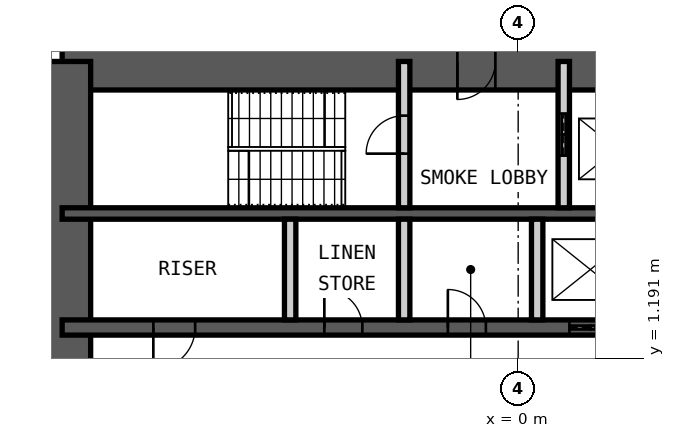
"""IFC4 building model, lengths in metres.
Left out: names, types, materials, properties, quantities, classifications, styles, units other than length and angle.
Written with IfcOpenShell. Run it as: python <this file> out.ifc"""

import sys

from ifc_helpers import new_model, si_unit, direction, frame, frame_2d, origin, place, context, subcontext, project, spatial, rectangle, extrude, element, fill, save


model = new_model("IFC4")
c1 = context("Model", 3, precision=1e-05, world=origin(), true_north=direction((0.0, 1.0)))
c2 = subcontext(c1, "Body", "Model", "MODEL_VIEW")
j1 = project(units=[si_unit("LENGTHUNIT", "METRE"), si_unit("PLANEANGLEUNIT", "RADIAN")], contexts=[c1])
p1 = place(None, origin())
s1 = spatial("IfcSite", under=j1, at=p1, CompositionType="ELEMENT")
p2 = place(p1, origin())
s2 = spatial("IfcBuilding", under=s1, at=p2, CompositionType="ELEMENT")
p3 = place(p2, frame((0.0, 0.0, 103.0)))
s3 = spatial("IfcBuildingStorey", under=s2, at=p3, CompositionType="ELEMENT", Elevation=103.0)
p4 = place(p3, frame((-12.0, 9.0, 0.0), z_axis=(0.0, 0.0, 1.0), x_axis=(1.0, 0.0, 0.0)))
e1 = element("IfcWall", 1, at=p4, inside=s3, PredefinedType="SHEAR", context=c2, shape_type="SweptSolid", body=[
    extrude(rectangle(XDim=24.0, YDim=1.5, at=frame_2d((12.0, 0.0))), origin(), (0.0, 0.0, 1.0), 4.2),
])
p5 = place(p4, frame((10.4, 0.0, 0.0)))
e2 = element("IfcOpeningElement", 2, at=p5, cuts=e1, PredefinedType="OPENING", context=c2, shape_type="SweptSolid", body=[
    extrude(rectangle(XDim=1.0, YDim=2.1, at=frame_2d((0.5, 1.05))), frame((0.0, 0.76, 0.0), z_axis=(0.0, -1.0, 0.0), x_axis=(1.0, 0.0, 0.0)), (0.0, 0.0, 1.0), 1.52),
])
p6 = place(p4, frame((17.6, 0.0, 0.0)))
e3 = element("IfcOpeningElement", 3, at=p6, cuts=e1, PredefinedType="OPENING", context=c2, shape_type="SweptSolid", body=[
    extrude(rectangle(XDim=0.9, YDim=2.1, at=frame_2d((0.45, 1.05))), frame((0.0, 0.76, 0.0), z_axis=(0.0, -1.0, 0.0), x_axis=(1.0, 0.0, 0.0)), (0.0, 0.0, 1.0), 1.52),
])
p7 = place(p4, frame((21.9, 0.0, 0.0)))
e4 = element("IfcOpeningElement", 4, at=p7, cuts=e1, PredefinedType="OPENING", context=c2, shape_type="SweptSolid", body=[
    extrude(rectangle(XDim=0.9, YDim=2.1, at=frame_2d((0.45, 1.05))), frame((0.0, 0.76, 0.0), z_axis=(0.0, -1.0, 0.0), x_axis=(1.0, 0.0, 0.0)), (0.0, 0.0, 1.0), 1.52),
])
p8 = place(p3, frame((-12.0, -9.0, 0.0), z_axis=(0.0, 0.0, 1.0), x_axis=(0.0, 1.0, 0.0)))
e5 = element("IfcWall", 5, at=p8, inside=s3, PredefinedType="SHEAR", context=c2, shape_type="SweptSolid", body=[
    extrude(rectangle(XDim=18.0, YDim=1.5, at=frame_2d((9.0, 0.0))), origin(), (0.0, 0.0, 1.0), 4.2),
])
p9 = place(p8, frame((8.1, 0.0, 0.0)))
e6 = element("IfcOpeningElement", 6, at=p9, cuts=e5, PredefinedType="OPENING", context=c2, shape_type="SweptSolid", body=[
    extrude(rectangle(XDim=1.8, YDim=2.1, at=frame_2d((0.9, 1.05))), frame((0.0, 0.76, 0.0), z_axis=(0.0, -1.0, 0.0), x_axis=(1.0, 0.0, 0.0)), (0.0, 0.0, 1.0), 1.52),
])
p10 = place(p3, frame((-12.0, 5.0, 0.0), z_axis=(0.0, 0.0, 1.0), x_axis=(1.0, 0.0, 0.0)))
e7 = element("IfcWall", 7, at=p10, inside=s3, PredefinedType="SHEAR", context=c2, shape_type="SweptSolid", body=[
    extrude(rectangle(XDim=24.0, YDim=0.3, at=frame_2d((12.0, 0.0))), origin(), (0.0, 0.0, 1.0), 4.2),
])
p11 = place(p3, frame((-12.0, 2.0, 0.0), z_axis=(0.0, 0.0, 1.0), x_axis=(1.0, 0.0, 0.0)))
e8 = element("IfcWall", 8, at=p11, inside=s3, PredefinedType="SHEAR", context=c2, shape_type="SweptSolid", body=[
    extrude(rectangle(XDim=24.0, YDim=0.4, at=frame_2d((12.0, 0.0))), origin(), (0.0, 0.0, 1.0), 4.2),
])
p12 = place(p11, frame((2.4, 0.0, 0.0)))
e9 = element("IfcOpeningElement", 9, at=p12, cuts=e8, PredefinedType="OPENING", context=c2, shape_type="SweptSolid", body=[
    extrude(rectangle(XDim=1.1, YDim=2.1, at=frame_2d((0.55, 1.05))), frame((0.0, 0.21, 0.0), z_axis=(0.0, -1.0, 0.0), x_axis=(1.0, 0.0, 0.0)), (0.0, 0.0, 1.0), 0.42),
])
p13 = place(p11, frame((22.0, 0.0, 0.0)))
e10 = element("IfcOpeningElement", 10, at=p13, cuts=e8, PredefinedType="OPENING", context=c2, shape_type="SweptSolid", body=[
    extrude(rectangle(XDim=1.1, YDim=2.1, at=frame_2d((0.55, 1.05))), frame((0.0, 0.21, 0.0), z_axis=(0.0, -1.0, 0.0), x_axis=(1.0, 0.0, 0.0)), (0.0, 0.0, 1.0), 0.42),
])
p14 = place(p11, frame((10.15, 0.0, 0.0)))
e11 = element("IfcOpeningElement", 11, at=p14, cuts=e8, PredefinedType="OPENING", context=c2, shape_type="SweptSolid", body=[
    extrude(rectangle(XDim=1.0, YDim=2.1, at=frame_2d((0.5, 1.05))), frame((0.0, 0.21, 0.0), z_axis=(0.0, -1.0, 0.0), x_axis=(1.0, 0.0, 0.0)), (0.0, 0.0, 1.0), 0.42),
])
p15 = place(p11, frame((6.9, 0.0, 0.0)))
e12 = element("IfcOpeningElement", 12, at=p15, cuts=e8, PredefinedType="OPENING", context=c2, shape_type="SweptSolid", body=[
    extrude(rectangle(XDim=1.0, YDim=2.1, at=frame_2d((0.5, 1.05))), frame((0.0, 0.21, 0.0), z_axis=(0.0, -1.0, 0.0), x_axis=(1.0, 0.0, 0.0)), (0.0, 0.0, 1.0), 0.42),
])
p16 = place(p11, frame((13.35, 0.0, 0.0)))
e13 = element("IfcOpeningElement", 13, at=p16, cuts=e8, PredefinedType="OPENING", context=c2, shape_type="SweptSolid", body=[
    extrude(rectangle(XDim=1.1, YDim=2.4, at=frame_2d((0.55, 1.2))), frame((0.0, 0.21, 0.0), z_axis=(0.0, -1.0, 0.0), x_axis=(1.0, 0.0, 0.0)), (0.0, 0.0, 1.0), 0.42),
])
p17 = place(p11, frame((16.15, 0.0, 0.0)))
e14 = element("IfcOpeningElement", 14, at=p17, cuts=e8, PredefinedType="OPENING", context=c2, shape_type="SweptSolid", body=[
    extrude(rectangle(XDim=1.1, YDim=2.4, at=frame_2d((0.55, 1.2))), frame((0.0, 0.21, 0.0), z_axis=(0.0, -1.0, 0.0), x_axis=(1.0, 0.0, 0.0)), (0.0, 0.0, 1.0), 0.42),
])
p18 = place(p11, frame((18.95, 0.0, 0.0)))
e15 = element("IfcOpeningElement", 15, at=p18, cuts=e8, PredefinedType="OPENING", context=c2, shape_type="SweptSolid", body=[
    extrude(rectangle(XDim=1.1, YDim=2.4, at=frame_2d((0.55, 1.2))), frame((0.0, 0.21, 0.0), z_axis=(0.0, -1.0, 0.0), x_axis=(1.0, 0.0, 0.0)), (0.0, 0.0, 1.0), 0.42),
])
p19 = place(p3, frame((-3.0, 5.15, 0.0), z_axis=(0.0, 0.0, 1.0), x_axis=(0.0, 1.0, 0.0)))
e16 = element("IfcWall", 16, at=p19, inside=s3, PredefinedType="PARTITIONING", context=c2, shape_type="SweptSolid", body=[
    extrude(rectangle(XDim=3.85, YDim=0.3, at=frame_2d((1.925, 0.0))), origin(), (0.0, 0.0, 1.0), 3.98),
])
p20 = place(p19, frame((1.425, 0.0, 0.0)))
e17 = element("IfcOpeningElement", 17, at=p20, cuts=e16, PredefinedType="OPENING", context=c2, shape_type="SweptSolid", body=[
    extrude(rectangle(XDim=1.0, YDim=2.1, at=frame_2d((0.5, 1.05))), frame((0.0, 0.16, 0.0), z_axis=(0.0, -1.0, 0.0), x_axis=(1.0, 0.0, 0.0)), (0.0, 0.0, 1.0), 0.32),
])
p21 = place(p3, frame((1.2, 5.15, 0.0), z_axis=(0.0, 0.0, 1.0), x_axis=(0.0, 1.0, 0.0)))
e18 = element("IfcWall", 18, at=p21, inside=s3, PredefinedType="PARTITIONING", context=c2, shape_type="SweptSolid", body=[
    extrude(rectangle(XDim=3.85, YDim=0.3, at=frame_2d((1.925, 0.0))), origin(), (0.0, 0.0, 1.0), 3.98),
])
p22 = place(p21, frame((1.375, 0.0, 0.0)))
e19 = element("IfcOpeningElement", 19, at=p22, cuts=e18, PredefinedType="OPENING", context=c2, shape_type="SweptSolid", body=[
    extrude(rectangle(XDim=1.1, YDim=2.4, at=frame_2d((0.55, 1.2))), frame((0.0, 0.16, 0.0), z_axis=(0.0, -1.0, 0.0), x_axis=(1.0, 0.0, 0.0)), (0.0, 0.0, 1.0), 0.32),
])
for number, where, z_axis, x_axis in (
    (20, (-6.0, 2.2, 0.0), (0.0, 0.0, 1.0), (0.0, 1.0, 0.0)),
    (21, (-3.0, 2.2, 0.0), (0.0, 0.0, 1.0), (0.0, 1.0, 0.0)),
    (22, (0.5, 2.2, 0.0), (0.0, 0.0, 1.0), (0.0, 1.0, 0.0)),
):
    element("IfcWall", number, at=place(p3, frame(where, z_axis=z_axis, x_axis=x_axis)), inside=s3, PredefinedType="PARTITIONING", context=c2, shape_type="SweptSolid", body=[
        extrude(rectangle(XDim=2.65, YDim=0.3, at=frame_2d((1.325, 0.0))), origin(), (0.0, 0.0, 1.0), 3.98),
    ])
p23 = place(p5, origin())
e23 = element("IfcDoor", 23, at=p23, inside=s3, OperationType="SINGLE_SWING_LEFT", PredefinedType="DOOR", context=c2, shape_type="SweptSolid", body=[
    extrude(rectangle(XDim=1.0, YDim=2.1, at=frame_2d((0.5, 1.05))), frame((0.0, 0.025, 0.0), z_axis=(0.0, -1.0, 0.0), x_axis=(1.0, 0.0, 0.0)), (0.0, 0.0, 1.0), 0.05),
])
fill(e2, e23)
p24 = place(p20, origin())
e24 = element("IfcDoor", 24, at=p24, inside=s3, OperationType="SINGLE_SWING_RIGHT", PredefinedType="DOOR", context=c2, shape_type="SweptSolid", body=[
    extrude(rectangle(XDim=1.0, YDim=2.1, at=frame_2d((0.5, 1.05))), frame((0.0, 0.025, 0.0), z_axis=(0.0, -1.0, 0.0), x_axis=(1.0, 0.0, 0.0)), (0.0, 0.0, 1.0), 0.05),
])
fill(e17, e24)
p25 = place(p12, origin())
e25 = element("IfcDoor", 25, at=p25, inside=s3, OperationType="SINGLE_SWING_LEFT", PredefinedType="DOOR", context=c2, shape_type="SweptSolid", body=[
    extrude(rectangle(XDim=1.1, YDim=2.1, at=frame_2d((0.55, 1.05))), frame((0.0, 0.025, 0.0), z_axis=(0.0, -1.0, 0.0), x_axis=(1.0, 0.0, 0.0)), (0.0, 0.0, 1.0), 0.05),
])
fill(e9, e25)
p26 = place(p14, origin())
e26 = element("IfcDoor", 26, at=p26, inside=s3, OperationType="SINGLE_SWING_RIGHT", PredefinedType="DOOR", context=c2, shape_type="SweptSolid", body=[
    extrude(rectangle(XDim=1.0, YDim=2.1, at=frame_2d((0.5, 1.05))), frame((0.0, 0.025, 0.0), z_axis=(0.0, -1.0, 0.0), x_axis=(1.0, 0.0, 0.0)), (0.0, 0.0, 1.0), 0.05),
])
fill(e11, e26)
p27 = place(p22, origin())
e27 = element("IfcDoor", 27, at=p27, inside=s3, OperationType="DOUBLE_DOOR_SLIDING", PredefinedType="DOOR", context=c2, shape_type="SweptSolid", body=[
    extrude(rectangle(XDim=1.1, YDim=2.4, at=frame_2d((0.55, 1.2))), frame((0.0, 0.025, 0.0), z_axis=(0.0, -1.0, 0.0), x_axis=(1.0, 0.0, 0.0)), (0.0, 0.0, 1.0), 0.05),
])
fill(e19, e27)
p28 = place(p15, origin())
e28 = element("IfcDoor", 28, at=p28, inside=s3, OperationType="SINGLE_SWING_RIGHT", PredefinedType="DOOR", context=c2, shape_type="SweptSolid", body=[
    extrude(rectangle(XDim=1.0, YDim=2.1, at=frame_2d((0.5, 1.05))), frame((0.0, 0.025, 0.0), z_axis=(0.0, -1.0, 0.0), x_axis=(1.0, 0.0, 0.0)), (0.0, 0.0, 1.0), 0.05),
])
fill(e12, e28)
p29 = place(p16, origin())
e29 = element("IfcDoor", 29, at=p29, inside=s3, OperationType="DOUBLE_DOOR_SLIDING", PredefinedType="DOOR", context=c2, shape_type="SweptSolid", body=[
    extrude(rectangle(XDim=1.1, YDim=2.4, at=frame_2d((0.55, 1.2))), frame((0.0, 0.025, 0.0), z_axis=(0.0, -1.0, 0.0), x_axis=(1.0, 0.0, 0.0)), (0.0, 0.0, 1.0), 0.05),
])
fill(e13, e29)
save(model, sys.argv[1])
